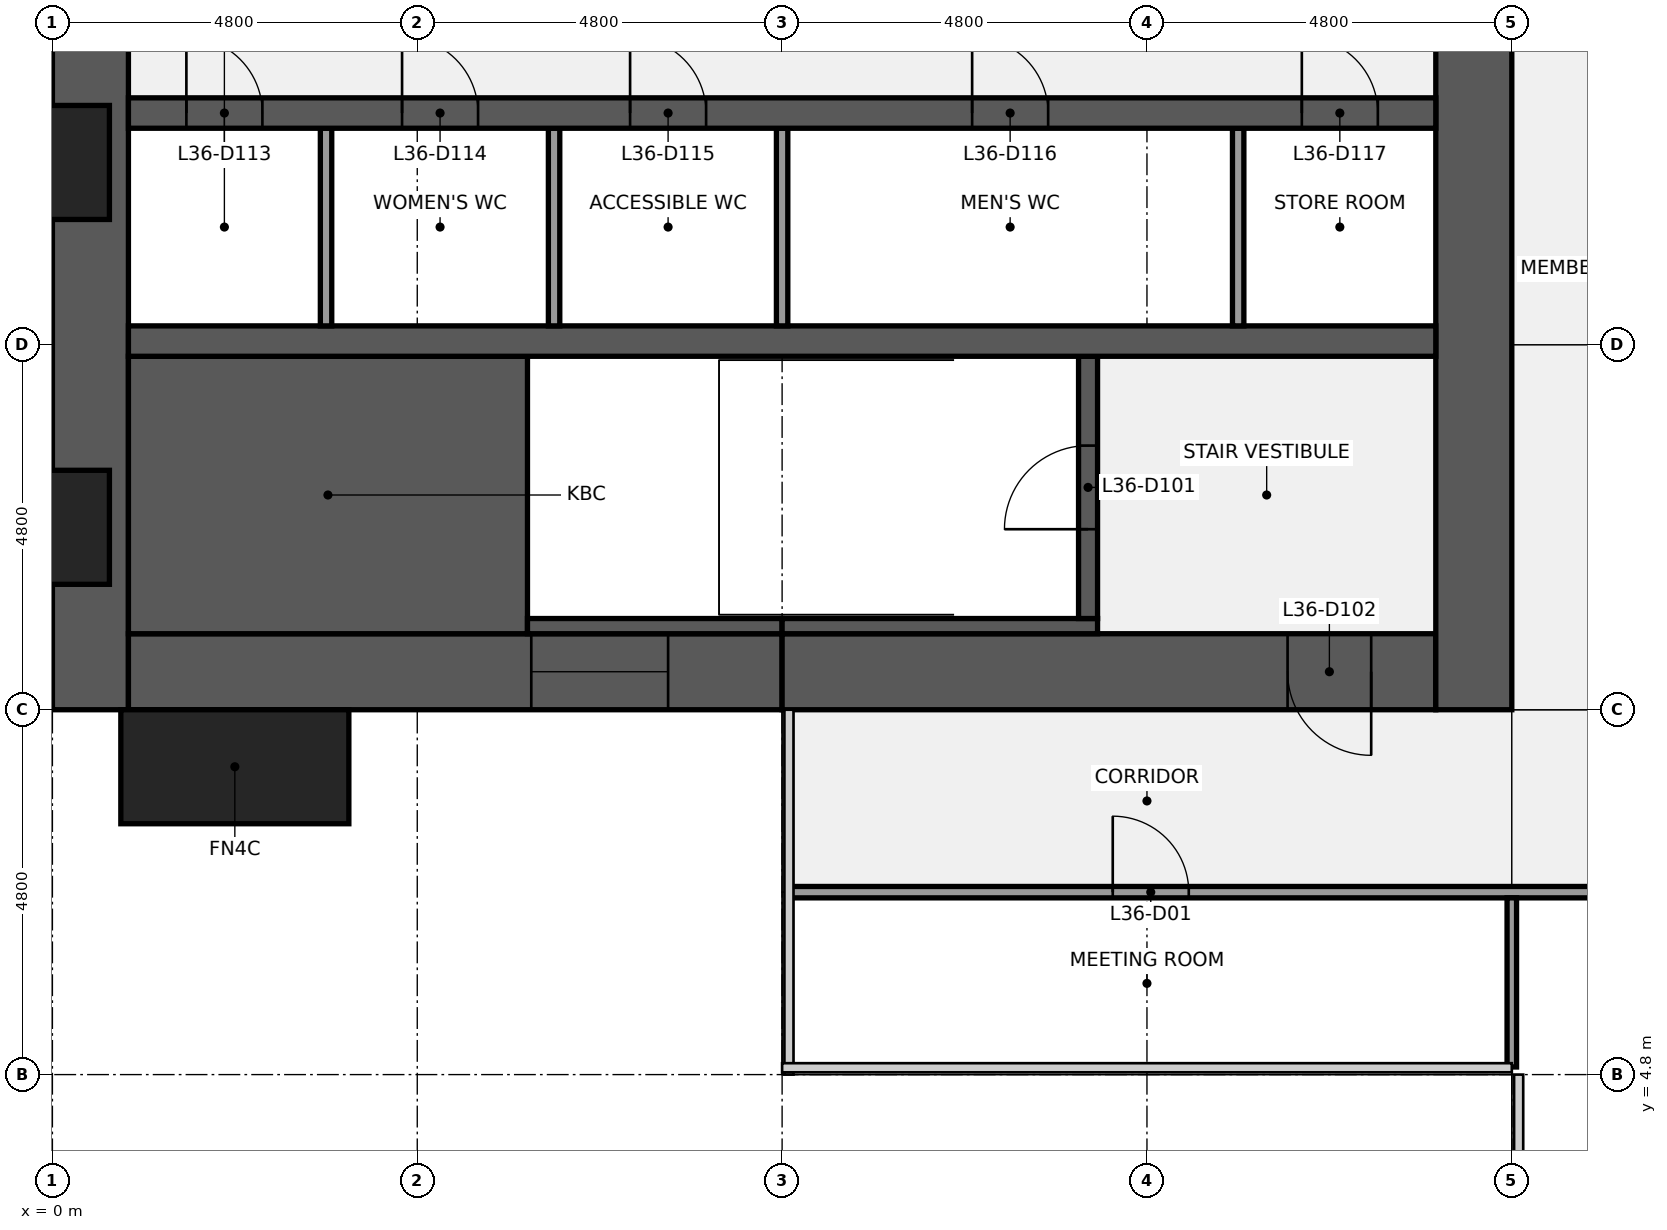
"""IFC4 building model, lengths in metres.
Left out: names, types, materials, properties, quantities, classifications, styles, units other than length and angle.
Written with IfcOpenShell. Run it as: python <this file> out.ifc"""

import sys

from ifc_helpers import new_model, si_unit, direction, frame, frame_2d, origin, origin_2d, place, context, subcontext, project, spatial, rectangle, extrude, element, fill, save


model = new_model("IFC4")
c1 = context("Model", 3, precision=1e-05, world=origin(), true_north=direction((0.0, 1.0)))
c2 = subcontext(c1, "Body", "Model", "MODEL_VIEW")
j1 = project(units=[si_unit("LENGTHUNIT", "METRE"), si_unit("PLANEANGLEUNIT", "RADIAN")], contexts=[c1])
p1 = place(None, origin())
s1 = spatial("IfcSite", under=j1, at=p1, CompositionType="ELEMENT")
p2 = place(p1, origin())
s2 = spatial("IfcBuilding", under=s1, at=p2, CompositionType="ELEMENT")
p3 = place(p2, frame((0.0, 0.0, 164.1)))
s3 = spatial("IfcBuildingStorey", under=s2, at=p3, CompositionType="ELEMENT", Elevation=164.1)
p4 = place(p3, frame((0.5, 9.6, 0.0), z_axis=(0.0, 0.0, 1.0), x_axis=(0.0, 1.0, 0.0)))
e1 = element("IfcWall", 1, at=p4, inside=s3, PredefinedType="SHEAR", context=c2, shape_type="SweptSolid", body=[
    extrude(rectangle(XDim=28.8, YDim=1.0, at=frame_2d((14.4, 0.0))), origin(), (0.0, 0.0, 1.0), 3.84),
])
p5 = place(p4, frame((8.85, 0.0, 0.9)))
e2 = element("IfcOpeningElement", 2, at=p5, cuts=e1, PredefinedType="OPENING", context=c2, shape_type="SweptSolid", body=[
    extrude(rectangle(XDim=1.5, YDim=1.5, at=frame_2d((0.75, 0.75))), frame((0.0, 0.51, 0.0), z_axis=(0.0, -1.0, 0.0), x_axis=(1.0, 0.0, 0.0)), (0.0, 0.0, 1.0), 1.02),
])
p6 = place(p4, frame((18.45, 0.0, 0.9)))
e3 = element("IfcOpeningElement", 3, at=p6, cuts=e1, PredefinedType="OPENING", context=c2, shape_type="SweptSolid", body=[
    extrude(rectangle(XDim=1.5, YDim=1.5, at=frame_2d((0.75, 0.75))), frame((0.0, 0.51, 0.0), z_axis=(0.0, -1.0, 0.0), x_axis=(1.0, 0.0, 0.0)), (0.0, 0.0, 1.0), 1.02),
])
p7 = place(p3, frame((9.6, 10.1, 0.0), z_axis=(0.0, 0.0, 1.0), x_axis=(-1.0, 0.0, 0.0)))
e4 = element("IfcWall", 4, at=p7, inside=s3, PredefinedType="SHEAR", context=c2, shape_type="SweptSolid", body=[
    extrude(rectangle(XDim=8.6, YDim=1.0, at=frame_2d((4.3, 0.0))), origin(), (0.0, 0.0, 1.0), 3.84),
])
p8 = place(p7, frame((1.5, 0.0, 0.9)))
e5 = element("IfcOpeningElement", 5, at=p8, cuts=e4, PredefinedType="OPENING", context=c2, shape_type="SweptSolid", body=[
    extrude(rectangle(XDim=1.8, YDim=1.5, at=frame_2d((0.9, 0.75))), frame((0.0, 0.51, 0.0), z_axis=(0.0, -1.0, 0.0), x_axis=(1.0, 0.0, 0.0)), (0.0, 0.0, 1.0), 1.02),
])
p9 = place(p3, frame((18.2, 10.1, 0.0), z_axis=(0.0, 0.0, 1.0), x_axis=(-1.0, 0.0, 0.0)))
e6 = element("IfcWall", 6, at=p9, inside=s3, PredefinedType="SHEAR", context=c2, shape_type="SweptSolid", body=[
    extrude(rectangle(XDim=8.6, YDim=1.0, at=frame_2d((4.3, 0.0))), origin(), (0.0, 0.0, 1.0), 3.84),
])
p10 = place(p9, frame((0.85, 0.0, 0.0)))
e7 = element("IfcOpeningElement", 7, at=p10, cuts=e6, PredefinedType="OPENING", context=c2, shape_type="SweptSolid", body=[
    extrude(rectangle(XDim=1.1, YDim=2.1, at=frame_2d((0.55, 1.05))), frame((0.0, 0.51, 0.0), z_axis=(0.0, -1.0, 0.0), x_axis=(1.0, 0.0, 0.0)), (0.0, 0.0, 1.0), 1.02),
])
p11 = place(p3, frame((18.7, 38.4, 0.0), z_axis=(0.0, 0.0, 1.0), x_axis=(0.0, -1.0, 0.0)))
e8 = element("IfcWall", 8, at=p11, inside=s3, PredefinedType="SHEAR", context=c2, shape_type="SweptSolid", body=[
    extrude(rectangle(XDim=28.8, YDim=1.0, at=frame_2d((14.4, 0.0))), origin(), (0.0, 0.0, 1.0), 3.84),
])
p12 = place(p11, frame((18.3, 0.0, 0.0)))
e9 = element("IfcOpeningElement", 9, at=p12, cuts=e8, PredefinedType="OPENING", context=c2, shape_type="SweptSolid", body=[
    extrude(rectangle(XDim=1.8, YDim=2.1, at=frame_2d((0.9, 1.05))), frame((0.0, 0.51, 0.0), z_axis=(0.0, -1.0, 0.0), x_axis=(1.0, 0.0, 0.0)), (0.0, 0.0, 1.0), 1.02),
])
p13 = place(p11, frame((8.7, 0.0, 0.0)))
e10 = element("IfcOpeningElement", 10, at=p13, cuts=e8, PredefinedType="OPENING", context=c2, shape_type="SweptSolid", body=[
    extrude(rectangle(XDim=1.8, YDim=2.1, at=frame_2d((0.9, 1.05))), frame((0.0, 0.51, 0.0), z_axis=(0.0, -1.0, 0.0), x_axis=(1.0, 0.0, 0.0)), (0.0, 0.0, 1.0), 1.02),
])
p14 = place(p3, frame((1.0, 12.425, 0.0), z_axis=(0.0, 0.0, 1.0), x_axis=(1.0, 0.0, 0.0)))
e11 = element("IfcWall", 11, at=p14, inside=s3, PredefinedType="SHEAR", context=c2, shape_type="SweptSolid", body=[
    extrude(rectangle(XDim=5.25, YDim=3.65, at=frame_2d((2.625, 0.0))), origin(), (0.0, 0.0, 1.0), 3.84),
])
p15 = place(p3, frame((6.25, 10.7, 0.0), z_axis=(0.0, 0.0, 1.0), x_axis=(1.0, 0.0, 0.0)))
e12 = element("IfcWall", 12, at=p15, inside=s3, PredefinedType="SHEAR", context=c2, shape_type="SweptSolid", body=[
    extrude(rectangle(XDim=3.35, YDim=0.2, at=frame_2d((1.675, 0.0))), origin(), (0.0, 0.0, 1.0), 3.84),
])
p16 = place(p3, frame((9.6, 10.7, 0.0), z_axis=(0.0, 0.0, 1.0), x_axis=(1.0, 0.0, 0.0)))
e13 = element("IfcWall", 13, at=p16, inside=s3, PredefinedType="SHEAR", context=c2, shape_type="SweptSolid", body=[
    extrude(rectangle(XDim=4.15, YDim=0.2, at=frame_2d((2.075, 0.0))), origin(), (0.0, 0.0, 1.0), 3.84),
])
p17 = place(p3, frame((13.625, 10.8, 0.0), z_axis=(0.0, 0.0, 1.0), x_axis=(0.0, 1.0, 0.0)))
e14 = element("IfcWall", 14, at=p17, inside=s3, PredefinedType="SHEAR", context=c2, shape_type="SweptSolid", body=[
    extrude(rectangle(XDim=3.45, YDim=0.25, at=frame_2d((1.725, 0.0))), origin(), (0.0, 0.0, 1.0), 3.84),
])
p18 = place(p17, frame((1.175, 0.0, 0.0)))
e15 = element("IfcOpeningElement", 15, at=p18, cuts=e14, PredefinedType="OPENING", context=c2, shape_type="SweptSolid", body=[
    extrude(rectangle(XDim=1.1, YDim=2.1, at=frame_2d((0.55, 1.05))), frame((0.0, 0.135, 0.0), z_axis=(0.0, -1.0, 0.0), x_axis=(1.0, 0.0, 0.0)), (0.0, 0.0, 1.0), 0.27),
])
p19 = place(p3, frame((1.0, 14.45, 0.0), z_axis=(0.0, 0.0, 1.0), x_axis=(1.0, 0.0, 0.0)))
e16 = element("IfcWall", 16, at=p19, inside=s3, PredefinedType="SHEAR", context=c2, shape_type="SweptSolid", body=[
    extrude(rectangle(XDim=17.2, YDim=0.4, at=frame_2d((8.6, 0.0))), origin(), (0.0, 0.0, 1.0), 3.84),
])
for number, where, z_axis, x_axis in (
    (17, (3.6, 14.65, 0.0), (0.0, 0.0, 1.0), (0.0, 1.0, 0.0)),
    (18, (6.6, 14.65, 0.0), (0.0, 0.0, 1.0), (0.0, 1.0, 0.0)),
    (19, (9.6, 14.65, 0.0), (0.0, 0.0, 1.0), (0.0, 1.0, 0.0)),
    (20, (15.6, 14.65, 0.0), (0.0, 0.0, 1.0), (0.0, 1.0, 0.0)),
):
    element("IfcWall", number, at=place(p3, frame(where, z_axis=z_axis, x_axis=x_axis)), inside=s3, PredefinedType="PARTITIONING", context=c2, shape_type="SweptSolid", body=[
        extrude(rectangle(XDim=2.6, YDim=0.15, at=frame_2d((1.3, 0.0))), origin(), (0.0, 0.0, 1.0), 3.84),
    ])
p20 = place(p3, frame((1.0, 17.45, 0.0), z_axis=(0.0, 0.0, 1.0), x_axis=(1.0, 0.0, 0.0)))
e21 = element("IfcWall", 21, at=p20, inside=s3, PredefinedType="SHEAR", context=c2, shape_type="SweptSolid", body=[
    extrude(rectangle(XDim=17.2, YDim=0.4, at=frame_2d((8.6, 0.0))), origin(), (0.0, 0.0, 1.0), 3.84),
])
p21 = place(p20, frame((0.762, 0.0, 0.0)))
e22 = element("IfcOpeningElement", 22, at=p21, cuts=e21, PredefinedType="OPENING", context=c2, shape_type="SweptSolid", body=[
    extrude(rectangle(XDim=1.0, YDim=2.1, at=frame_2d((0.5, 1.05))), frame((0.0, 0.21, 0.0), z_axis=(0.0, -1.0, 0.0), x_axis=(1.0, 0.0, 0.0)), (0.0, 0.0, 1.0), 0.42),
])
p22 = place(p20, frame((3.6, 0.0, 0.0)))
e23 = element("IfcOpeningElement", 23, at=p22, cuts=e21, PredefinedType="OPENING", context=c2, shape_type="SweptSolid", body=[
    extrude(rectangle(XDim=1.0, YDim=2.1, at=frame_2d((0.5, 1.05))), frame((0.0, 0.21, 0.0), z_axis=(0.0, -1.0, 0.0), x_axis=(1.0, 0.0, 0.0)), (0.0, 0.0, 1.0), 0.42),
])
p23 = place(p20, frame((6.6, 0.0, 0.0)))
e24 = element("IfcOpeningElement", 24, at=p23, cuts=e21, PredefinedType="OPENING", context=c2, shape_type="SweptSolid", body=[
    extrude(rectangle(XDim=1.0, YDim=2.1, at=frame_2d((0.5, 1.05))), frame((0.0, 0.21, 0.0), z_axis=(0.0, -1.0, 0.0), x_axis=(1.0, 0.0, 0.0)), (0.0, 0.0, 1.0), 0.42),
])
p24 = place(p20, frame((11.1, 0.0, 0.0)))
e25 = element("IfcOpeningElement", 25, at=p24, cuts=e21, PredefinedType="OPENING", context=c2, shape_type="SweptSolid", body=[
    extrude(rectangle(XDim=1.0, YDim=2.1, at=frame_2d((0.5, 1.05))), frame((0.0, 0.21, 0.0), z_axis=(0.0, -1.0, 0.0), x_axis=(1.0, 0.0, 0.0)), (0.0, 0.0, 1.0), 0.42),
])
p25 = place(p20, frame((15.438, 0.0, 0.0)))
e26 = element("IfcOpeningElement", 26, at=p25, cuts=e21, PredefinedType="OPENING", context=c2, shape_type="SweptSolid", body=[
    extrude(rectangle(XDim=1.0, YDim=2.1, at=frame_2d((0.5, 1.05))), frame((0.0, 0.21, 0.0), z_axis=(0.0, -1.0, 0.0), x_axis=(1.0, 0.0, 0.0)), (0.0, 0.0, 1.0), 0.42),
])
p26 = place(p3, frame((9.7, 7.2, 0.0), z_axis=(0.0, 0.0, 1.0), x_axis=(1.0, 0.0, 0.0)))
e27 = element("IfcWall", 27, at=p26, inside=s3, PredefinedType="PARTITIONING", context=c2, shape_type="SweptSolid", body=[
    extrude(rectangle(XDim=38.2, YDim=0.15, at=frame_2d((19.1, 0.0))), origin(), (0.0, 0.0, 1.0), 2.936),
])
p27 = place(p26, frame((4.25, 0.0, 0.0)))
e28 = element("IfcOpeningElement", 28, at=p27, cuts=e27, PredefinedType="OPENING", context=c2, shape_type="SweptSolid", body=[
    extrude(rectangle(XDim=1.0, YDim=2.1, at=frame_2d((0.5, 1.05))), frame((0.0, 0.085, 0.0), z_axis=(0.0, -1.0, 0.0), x_axis=(1.0, 0.0, 0.0)), (0.0, 0.0, 1.0), 0.17),
])
p28 = place(p26, frame((13.8, 0.0, 0.0)))
e29 = element("IfcOpeningElement", 29, at=p28, cuts=e27, PredefinedType="OPENING", context=c2, shape_type="SweptSolid", body=[
    extrude(rectangle(XDim=1.0, YDim=2.1, at=frame_2d((0.5, 1.05))), frame((0.0, 0.085, 0.0), z_axis=(0.0, -1.0, 0.0), x_axis=(1.0, 0.0, 0.0)), (0.0, 0.0, 1.0), 0.17),
])
p29 = place(p26, frame((19.8, 0.0, 0.0)))
e30 = element("IfcOpeningElement", 30, at=p29, cuts=e27, PredefinedType="OPENING", context=c2, shape_type="SweptSolid", body=[
    extrude(rectangle(XDim=1.0, YDim=2.1, at=frame_2d((0.5, 1.05))), frame((0.0, 0.085, 0.0), z_axis=(0.0, -1.0, 0.0), x_axis=(1.0, 0.0, 0.0)), (0.0, 0.0, 1.0), 0.17),
])
p30 = place(p26, frame((23.4, 0.0, 0.0)))
e31 = element("IfcOpeningElement", 31, at=p30, cuts=e27, PredefinedType="OPENING", context=c2, shape_type="SweptSolid", body=[
    extrude(rectangle(XDim=1.0, YDim=2.1, at=frame_2d((0.5, 1.05))), frame((0.0, 0.085, 0.0), z_axis=(0.0, -1.0, 0.0), x_axis=(1.0, 0.0, 0.0)), (0.0, 0.0, 1.0), 0.17),
])
p31 = place(p26, frame((27.0, 0.0, 0.0)))
e32 = element("IfcOpeningElement", 32, at=p31, cuts=e27, PredefinedType="OPENING", context=c2, shape_type="SweptSolid", body=[
    extrude(rectangle(XDim=1.0, YDim=2.1, at=frame_2d((0.5, 1.05))), frame((0.0, 0.085, 0.0), z_axis=(0.0, -1.0, 0.0), x_axis=(1.0, 0.0, 0.0)), (0.0, 0.0, 1.0), 0.17),
])
p32 = place(p26, frame((32.95, 0.0, 0.0)))
e33 = element("IfcOpeningElement", 33, at=p32, cuts=e27, PredefinedType="OPENING", context=c2, shape_type="SweptSolid", body=[
    extrude(rectangle(XDim=1.0, YDim=2.1, at=frame_2d((0.5, 1.05))), frame((0.0, 0.085, 0.0), z_axis=(0.0, -1.0, 0.0), x_axis=(1.0, 0.0, 0.0)), (0.0, 0.0, 1.0), 0.17),
])
p33 = place(p3, frame((19.2, 4.9, 0.0), z_axis=(0.0, 0.0, 1.0), x_axis=(0.0, 1.0, 0.0)))
e34 = element("IfcWall", 34, at=p33, inside=s3, PredefinedType="PARTITIONING", context=c2, shape_type="SweptSolid", body=[
    extrude(rectangle(XDim=2.225, YDim=0.125, at=frame_2d((1.113, 0.0))), origin(), (0.0, 0.0, 1.0), 2.936),
])
p34 = place(p3, frame((2.4, 8.85, 0.0), z_axis=(0.0, 0.0, 1.0), x_axis=(1.0, 0.0, 0.0)))
e35 = element("IfcColumn", 35, at=p34, inside=s3, PredefinedType="PILASTER", context=c2, shape_type="SweptSolid", body=[
    extrude(rectangle(XDim=3.0, YDim=1.5, at=origin_2d()), origin(), (0.0, 0.0, 1.0), 4.0),
])
p35 = place(p18, origin())
e36 = element("IfcDoor", 36, at=p35, inside=s3, OperationType="SINGLE_SWING_LEFT", PredefinedType="DOOR", context=c2, shape_type="SweptSolid", body=[
    extrude(rectangle(XDim=1.1, YDim=2.1, at=frame_2d((0.55, 1.05))), frame((0.0, 0.025, 0.0), z_axis=(0.0, -1.0, 0.0), x_axis=(1.0, 0.0, 0.0)), (0.0, 0.0, 1.0), 0.05),
])
fill(e15, e36)
p36 = place(p10, origin())
e37 = element("IfcDoor", 37, at=p36, inside=s3, OperationType="SINGLE_SWING_LEFT", PredefinedType="DOOR", context=c2, shape_type="SweptSolid", body=[
    extrude(rectangle(XDim=1.1, YDim=2.1, at=frame_2d((0.55, 1.05))), frame((0.0, 0.025, 0.0), z_axis=(0.0, -1.0, 0.0), x_axis=(1.0, 0.0, 0.0)), (0.0, 0.0, 1.0), 0.05),
])
fill(e7, e37)
p37 = place(p21, origin())
e38 = element("IfcDoor", 38, at=p37, inside=s3, OperationType="SINGLE_SWING_LEFT", PredefinedType="DOOR", context=c2, shape_type="SweptSolid", body=[
    extrude(rectangle(XDim=1.0, YDim=2.1, at=frame_2d((0.5, 1.05))), frame((0.0, 0.025, 0.0), z_axis=(0.0, -1.0, 0.0), x_axis=(1.0, 0.0, 0.0)), (0.0, 0.0, 1.0), 0.05),
])
fill(e22, e38)
p38 = place(p22, origin())
e39 = element("IfcDoor", 39, at=p38, inside=s3, OperationType="SINGLE_SWING_LEFT", PredefinedType="DOOR", context=c2, shape_type="SweptSolid", body=[
    extrude(rectangle(XDim=1.0, YDim=2.1, at=frame_2d((0.5, 1.05))), frame((0.0, 0.025, 0.0), z_axis=(0.0, -1.0, 0.0), x_axis=(1.0, 0.0, 0.0)), (0.0, 0.0, 1.0), 0.05),
])
fill(e23, e39)
p39 = place(p23, origin())
e40 = element("IfcDoor", 40, at=p39, inside=s3, OperationType="SINGLE_SWING_LEFT", PredefinedType="DOOR", context=c2, shape_type="SweptSolid", body=[
    extrude(rectangle(XDim=1.0, YDim=2.1, at=frame_2d((0.5, 1.05))), frame((0.0, 0.025, 0.0), z_axis=(0.0, -1.0, 0.0), x_axis=(1.0, 0.0, 0.0)), (0.0, 0.0, 1.0), 0.05),
])
fill(e24, e40)
p40 = place(p24, origin())
e41 = element("IfcDoor", 41, at=p40, inside=s3, OperationType="SINGLE_SWING_LEFT", PredefinedType="DOOR", context=c2, shape_type="SweptSolid", body=[
    extrude(rectangle(XDim=1.0, YDim=2.1, at=frame_2d((0.5, 1.05))), frame((0.0, 0.025, 0.0), z_axis=(0.0, -1.0, 0.0), x_axis=(1.0, 0.0, 0.0)), (0.0, 0.0, 1.0), 0.05),
])
fill(e25, e41)
p41 = place(p25, origin())
e42 = element("IfcDoor", 42, at=p41, inside=s3, OperationType="SINGLE_SWING_LEFT", PredefinedType="DOOR", context=c2, shape_type="SweptSolid", body=[
    extrude(rectangle(XDim=1.0, YDim=2.1, at=frame_2d((0.5, 1.05))), frame((0.0, 0.025, 0.0), z_axis=(0.0, -1.0, 0.0), x_axis=(1.0, 0.0, 0.0)), (0.0, 0.0, 1.0), 0.05),
])
fill(e26, e42)
p42 = place(p8, origin())
e43 = element("IfcWindow", 43, at=p42, inside=s3, PartitioningType="SINGLE_PANEL", PredefinedType="WINDOW", context=c2, shape_type="SweptSolid", body=[
    extrude(rectangle(XDim=1.8, YDim=1.5, at=frame_2d((0.9, 0.75))), frame((0.0, 0.03, 0.0), z_axis=(0.0, -1.0, 0.0), x_axis=(1.0, 0.0, 0.0)), (0.0, 0.0, 1.0), 0.06),
])
fill(e5, e43)
p43 = place(p27, origin())
e44 = element("IfcDoor", 44, at=p43, inside=s3, OperationType="SINGLE_SWING_LEFT", PredefinedType="DOOR", context=c2, shape_type="SweptSolid", body=[
    extrude(rectangle(XDim=1.0, YDim=2.1, at=frame_2d((0.5, 1.05))), frame((0.0, 0.025, 0.0), z_axis=(0.0, -1.0, 0.0), x_axis=(1.0, 0.0, 0.0)), (0.0, 0.0, 1.0), 0.05),
])
fill(e28, e44)
save(model, sys.argv[1])
